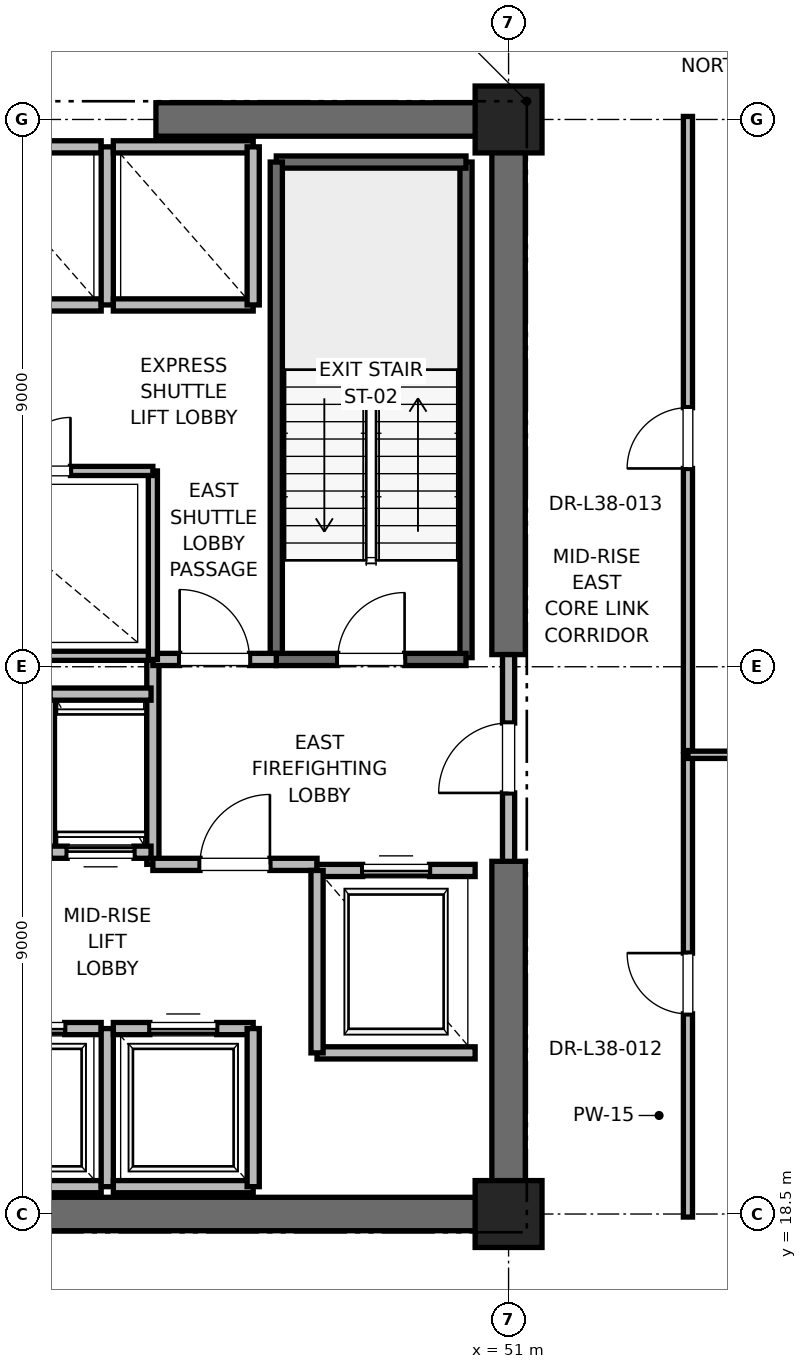
"""IFC4 building model, lengths in metres.
Left out: names, types, materials, properties, quantities, classifications, styles, units other than length and angle.
Written with IfcOpenShell. Run it as: python <this file> out.ifc"""

import sys

from ifc_helpers import new_model, si_unit, direction, frame, frame_2d, origin, origin_2d, place, context, subcontext, project, spatial, rectangle, extrude, element, fill, save


model = new_model("IFC4")
c1 = context("Model", 3, precision=1e-05, world=origin(), true_north=direction((0.0, 1.0)))
c2 = subcontext(c1, "Body", "Model", "MODEL_VIEW")
j1 = project(units=[si_unit("LENGTHUNIT", "METRE"), si_unit("PLANEANGLEUNIT", "RADIAN")], contexts=[c1])
p1 = place(None, origin())
s1 = spatial("IfcSite", under=j1, at=p1, CompositionType="ELEMENT")
p2 = place(p1, origin())
s2 = spatial("IfcBuilding", under=s1, at=p2, CompositionType="ELEMENT")
p3 = place(p2, frame((0.0, 0.0, 164.4)))
s3 = spatial("IfcBuildingStorey", under=s2, at=p3, CompositionType="ELEMENT", Elevation=164.4)
for number, where, z_axis, x_axis in (
    (1, (51.0, 18.5, 0.0), (0.0, 0.0, 1.0), (1.0, 0.0, 0.0)),
    (2, (51.0, 36.5, 0.0), (0.0, 0.0, 1.0), (1.0, 0.0, 0.0)),
):
    element("IfcColumn", number, at=place(p3, frame(where, z_axis=z_axis, x_axis=x_axis)), inside=s3, PredefinedType="PILASTER", context=c2, shape_type="SweptSolid", body=[
        extrude(rectangle(XDim=1.1, YDim=1.1, at=origin_2d()), origin(), (0.0, 0.0, 1.0), 4.0),
    ])
p4 = place(p3, frame((41.8, 18.5, 0.0), z_axis=(0.0, 0.0, 1.0), x_axis=(1.0, 0.0, 0.0)))
e3 = element("IfcWall", 3, at=p4, inside=s3, PredefinedType="SHEAR", context=c2, shape_type="SweptSolid", body=[
    extrude(rectangle(XDim=9.2, YDim=0.55, at=frame_2d((4.6, 0.0))), origin(), (0.0, 0.0, 1.0), 3.775),
])
for number, where, z_axis, x_axis in (
    (4, (45.2, 36.5, 0.0), (0.0, 0.0, 1.0), (1.0, 0.0, 0.0)),
    (5, (51.0, 18.5, 0.0), (0.0, 0.0, 1.0), (0.0, 1.0, 0.0)),
):
    element("IfcWall", number, at=place(p3, frame(where, z_axis=z_axis, x_axis=x_axis)), inside=s3, PredefinedType="SHEAR", context=c2, shape_type="SweptSolid", body=[
        extrude(rectangle(XDim=5.8, YDim=0.55, at=frame_2d((2.9, 0.0))), origin(), (0.0, 0.0, 1.0), 3.775),
    ])
p5 = place(p3, frame((51.0, 27.7, 0.0), z_axis=(0.0, 0.0, 1.0), x_axis=(0.0, 1.0, 0.0)))
e6 = element("IfcWall", 6, at=p5, inside=s3, PredefinedType="SHEAR", context=c2, shape_type="SweptSolid", body=[
    extrude(rectangle(XDim=8.8, YDim=0.55, at=frame_2d((4.4, 0.0))), origin(), (0.0, 0.0, 1.0), 3.775),
])
p6 = place(p3, frame((50.3, 27.65, 0.0), z_axis=(0.0, 0.0, 1.0), x_axis=(0.0, 1.0, 0.0)))
e7 = element("IfcWall", 7, at=p6, inside=s3, PredefinedType="SOLIDWALL", context=c2, shape_type="SweptSolid", body=[
    extrude(rectangle(XDim=8.15, YDim=0.2, at=frame_2d((4.075, 0.0))), origin(), (0.0, 0.0, 1.0), 3.775),
])
p7 = place(p3, frame((47.18, 35.8, 0.0), z_axis=(0.0, 0.0, 1.0), x_axis=(1.0, 0.0, 0.0)))
e8 = element("IfcWall", 8, at=p7, inside=s3, PredefinedType="SOLIDWALL", context=c2, shape_type="SweptSolid", body=[
    extrude(rectangle(XDim=3.12, YDim=0.2, at=frame_2d((1.56, 0.0))), origin(), (0.0, 0.0, 1.0), 3.775),
])
p8 = place(p3, frame((47.18, 27.62, 0.0), z_axis=(0.0, 0.0, 1.0), x_axis=(0.0, 1.0, 0.0)))
e9 = element("IfcWall", 9, at=p8, inside=s3, PredefinedType="SOLIDWALL", context=c2, shape_type="SweptSolid", body=[
    extrude(rectangle(XDim=8.18, YDim=0.2, at=frame_2d((4.09, 0.0))), origin(), (0.0, 0.0, 1.0), 3.775),
])
p9 = place(p3, frame((47.18, 27.62, 0.0), z_axis=(0.0, 0.0, 1.0), x_axis=(1.0, 0.0, 0.0)))
e10 = element("IfcWall", 10, at=p9, inside=s3, PredefinedType="SOLIDWALL", context=c2, shape_type="SweptSolid", body=[
    extrude(rectangle(XDim=3.12, YDim=0.2, at=frame_2d((1.56, 0.0))), origin(), (0.0, 0.0, 1.0), 3.775),
])
p10 = place(p9, frame((1.01, 0.0, 0.0)))
e11 = element("IfcOpeningElement", 11, at=p10, cuts=e10, PredefinedType="OPENING", context=c2, shape_type="SweptSolid", body=[
    extrude(rectangle(XDim=1.1, YDim=2.15, at=frame_2d((0.55, 1.075))), frame((0.0, 0.1, 0.0), z_axis=(0.0, -1.0, 0.0), x_axis=(1.0, 0.0, 0.0)), (0.0, 0.0, 1.0), 0.2),
])
p11 = place(p3, frame((45.15, 24.25, 0.0), z_axis=(0.0, 0.0, 1.0), x_axis=(0.0, 1.0, 0.0)))
e12 = element("IfcWall", 12, at=p11, inside=s3, PredefinedType="PARTITIONING", context=c2, shape_type="SweptSolid", body=[
    extrude(rectangle(XDim=3.37, YDim=0.2, at=frame_2d((1.685, 0.0))), origin(), (0.0, 0.0, 1.0), 3.775),
])
p12 = place(p3, frame((45.15, 24.25, 0.0), z_axis=(0.0, 0.0, 1.0), x_axis=(1.0, 0.0, 0.0)))
e13 = element("IfcWall", 13, at=p12, inside=s3, PredefinedType="PARTITIONING", context=c2, shape_type="SweptSolid", body=[
    extrude(rectangle(XDim=2.7, YDim=0.2, at=frame_2d((1.35, 0.0))), origin(), (0.0, 0.0, 1.0), 3.775),
])
p13 = place(p12, frame((0.775, 0.0, 0.0)))
e14 = element("IfcOpeningElement", 14, at=p13, cuts=e13, PredefinedType="OPENING", context=c2, shape_type="SweptSolid", body=[
    extrude(rectangle(XDim=1.15, YDim=2.2, at=frame_2d((0.575, 1.1))), frame((0.0, 0.1, 0.0), z_axis=(0.0, -1.0, 0.0), x_axis=(1.0, 0.0, 0.0)), (0.0, 0.0, 1.0), 0.2),
])
p14 = place(p3, frame((45.15, 27.62, 0.0), z_axis=(0.0, 0.0, 1.0), x_axis=(1.0, 0.0, 0.0)))
e15 = element("IfcWall", 15, at=p14, inside=s3, PredefinedType="PARTITIONING", context=c2, shape_type="SweptSolid", body=[
    extrude(rectangle(XDim=2.03, YDim=0.2, at=frame_2d((1.015, 0.0))), origin(), (0.0, 0.0, 1.0), 3.775),
])
p15 = place(p14, frame((0.44, 0.0, 0.0)))
e16 = element("IfcOpeningElement", 16, at=p15, cuts=e15, PredefinedType="OPENING", context=c2, shape_type="SweptSolid", body=[
    extrude(rectangle(XDim=1.15, YDim=2.2, at=frame_2d((0.575, 1.1))), frame((0.0, 0.1, 0.0), z_axis=(0.0, -1.0, 0.0), x_axis=(1.0, 0.0, 0.0)), (0.0, 0.0, 1.0), 0.2),
])
p16 = place(p3, frame((51.0, 24.3, 0.0), z_axis=(0.0, 0.0, 1.0), x_axis=(0.0, 1.0, 0.0)))
e17 = element("IfcWall", 17, at=p16, inside=s3, PredefinedType="PARTITIONING", context=c2, shape_type="SweptSolid", body=[
    extrude(rectangle(XDim=3.4, YDim=0.2, at=frame_2d((1.7, 0.0))), origin(), (0.0, 0.0, 1.0), 2.755),
])
p17 = place(p16, frame((1.125, 0.0, 0.0)))
e18 = element("IfcOpeningElement", 18, at=p17, cuts=e17, PredefinedType="OPENING", context=c2, shape_type="SweptSolid", body=[
    extrude(rectangle(XDim=1.15, YDim=2.2, at=frame_2d((0.575, 1.1))), frame((0.0, 0.1, 0.0), z_axis=(0.0, -1.0, 0.0), x_axis=(1.0, 0.0, 0.0)), (0.0, 0.0, 1.0), 0.2),
])
p18 = place(p3, frame((47.85, 21.15, 0.0), z_axis=(0.0, 0.0, 1.0), x_axis=(1.0, 0.0, 0.0)))
e19 = element("IfcWall", 19, at=p18, inside=s3, PredefinedType="SOLIDWALL", context=c2, shape_type="SweptSolid", body=[
    extrude(rectangle(XDim=2.6, YDim=0.2, at=frame_2d((1.3, 0.0))), origin(), (0.0, 0.0, 1.0), 3.775),
])
p19 = place(p3, frame((50.45, 24.15, 0.0), z_axis=(0.0, 0.0, 1.0), x_axis=(-1.0, 0.0, 0.0)))
e20 = element("IfcWall", 20, at=p19, inside=s3, PredefinedType="SOLIDWALL", context=c2, shape_type="SweptSolid", body=[
    extrude(rectangle(XDim=2.6, YDim=0.2, at=frame_2d((1.3, 0.0))), origin(), (0.0, 0.0, 1.0), 2.755),
])
p20 = place(p19, frame((0.75, 0.0, 0.0)))
e21 = element("IfcOpeningElement", 21, at=p20, cuts=e20, PredefinedType="OPENING", context=c2, shape_type="SweptSolid", body=[
    extrude(rectangle(XDim=1.1, YDim=2.2, at=frame_2d((0.55, 1.1))), frame((0.0, 0.1, 0.0), z_axis=(0.0, -1.0, 0.0), x_axis=(1.0, 0.0, 0.0)), (0.0, 0.0, 1.0), 0.2),
])
p21 = place(p3, frame((47.85, 24.15, 0.0), z_axis=(0.0, 0.0, 1.0), x_axis=(0.0, -1.0, 0.0)))
e22 = element("IfcWall", 22, at=p21, inside=s3, PredefinedType="SOLIDWALL", context=c2, shape_type="SweptSolid", body=[
    extrude(rectangle(XDim=3.0, YDim=0.2, at=frame_2d((1.5, 0.0))), origin(), (0.0, 0.0, 1.0), 3.775),
])
p22 = place(p3, frame((42.0, 18.95, 0.0), z_axis=(0.0, 0.0, 1.0), x_axis=(1.0, 0.0, 0.0)))
e23 = element("IfcWall", 23, at=p22, inside=s3, PredefinedType="SOLIDWALL", context=c2, shape_type="SweptSolid", body=[
    extrude(rectangle(XDim=2.3, YDim=0.2, at=frame_2d((1.15, 0.0))), origin(), (0.0, 0.0, 1.0), 2.755),
])
p23 = place(p3, frame((44.3, 21.55, 0.0), z_axis=(0.0, 0.0, 1.0), x_axis=(-1.0, 0.0, 0.0)))
e24 = element("IfcWall", 24, at=p23, inside=s3, PredefinedType="SOLIDWALL", context=c2, shape_type="SweptSolid", body=[
    extrude(rectangle(XDim=2.3, YDim=0.2, at=frame_2d((1.15, 0.0))), origin(), (0.0, 0.0, 1.0), 3.775),
])
p24 = place(p23, frame((0.6, 0.0, 0.0)))
e25 = element("IfcOpeningElement", 25, at=p24, cuts=e24, PredefinedType="OPENING", context=c2, shape_type="SweptSolid", body=[
    extrude(rectangle(XDim=1.1, YDim=2.2, at=frame_2d((0.55, 1.1))), frame((0.0, 0.1, 0.0), z_axis=(0.0, -1.0, 0.0), x_axis=(1.0, 0.0, 0.0)), (0.0, 0.0, 1.0), 0.2),
])
p25 = place(p3, frame((44.4, 18.95, 0.0), z_axis=(0.0, 0.0, 1.0), x_axis=(0.0, 1.0, 0.0)))
e26 = element("IfcWall", 26, at=p25, inside=s3, PredefinedType="SOLIDWALL", context=c2, shape_type="SweptSolid", body=[
    extrude(rectangle(XDim=2.6, YDim=0.2, at=frame_2d((1.3, 0.0))), origin(), (0.0, 0.0, 1.0), 3.775),
])
p26 = place(p3, frame((44.5, 18.95, 0.0), z_axis=(0.0, 0.0, 1.0), x_axis=(1.0, 0.0, 0.0)))
e27 = element("IfcWall", 27, at=p26, inside=s3, PredefinedType="SOLIDWALL", context=c2, shape_type="SweptSolid", body=[
    extrude(rectangle(XDim=2.3, YDim=0.2, at=frame_2d((1.15, 0.0))), origin(), (0.0, 0.0, 1.0), 3.775),
])
p27 = place(p3, frame((46.8, 21.55, 0.0), z_axis=(0.0, 0.0, 1.0), x_axis=(-1.0, 0.0, 0.0)))
e28 = element("IfcWall", 28, at=p27, inside=s3, PredefinedType="SOLIDWALL", context=c2, shape_type="SweptSolid", body=[
    extrude(rectangle(XDim=2.3, YDim=0.2, at=frame_2d((1.15, 0.0))), origin(), (0.0, 0.0, 1.0), 3.775),
])
p28 = place(p27, frame((0.6, 0.0, 0.0)))
e29 = element("IfcOpeningElement", 29, at=p28, cuts=e28, PredefinedType="OPENING", context=c2, shape_type="SweptSolid", body=[
    extrude(rectangle(XDim=1.1, YDim=2.2, at=frame_2d((0.55, 1.1))), frame((0.0, 0.1, 0.0), z_axis=(0.0, -1.0, 0.0), x_axis=(1.0, 0.0, 0.0)), (0.0, 0.0, 1.0), 0.2),
])
for number, where, z_axis, x_axis in (
    (30, (46.8, 18.95, 0.0), (0.0, 0.0, 1.0), (0.0, 1.0, 0.0)),
    (31, (43.45, 24.45, 0.0), (0.0, 0.0, 1.0), (0.0, 1.0, 0.0)),
):
    element("IfcWall", number, at=place(p3, frame(where, z_axis=z_axis, x_axis=x_axis)), inside=s3, PredefinedType="SOLIDWALL", context=c2, shape_type="SweptSolid", body=[
        extrude(rectangle(XDim=2.6, YDim=0.2, at=frame_2d((1.3, 0.0))), origin(), (0.0, 0.0, 1.0), 3.775),
    ])
p29 = place(p3, frame((43.46, 24.45, 0.0), z_axis=(0.0, 0.0, 1.0), x_axis=(1.0, 0.0, 0.0)))
e32 = element("IfcWall", 32, at=p29, inside=s3, PredefinedType="SOLIDWALL", context=c2, shape_type="SweptSolid", body=[
    extrude(rectangle(XDim=1.66, YDim=0.2, at=frame_2d((0.83, 0.0))), origin(), (0.0, 0.0, 1.0), 3.775),
])
p30 = place(p29, frame((0.28, 0.0, 0.0)))
e33 = element("IfcOpeningElement", 33, at=p30, cuts=e32, PredefinedType="OPENING", context=c2, shape_type="SweptSolid", body=[
    extrude(rectangle(XDim=1.1, YDim=2.2, at=frame_2d((0.55, 1.1))), frame((0.0, 0.1, 0.0), z_axis=(0.0, -1.0, 0.0), x_axis=(1.0, 0.0, 0.0)), (0.0, 0.0, 1.0), 0.2),
])
p31 = place(p3, frame((45.12, 27.05, 0.0), z_axis=(0.0, 0.0, 1.0), x_axis=(-1.0, 0.0, 0.0)))
e34 = element("IfcWall", 34, at=p31, inside=s3, PredefinedType="SOLIDWALL", context=c2, shape_type="SweptSolid", body=[
    extrude(rectangle(XDim=1.66, YDim=0.2, at=frame_2d((0.83, 0.0))), origin(), (0.0, 0.0, 1.0), 3.775),
])
p32 = place(p3, frame((42.0, 33.45, 0.0), z_axis=(0.0, 0.0, 1.0), x_axis=(1.0, 0.0, 0.0)))
e35 = element("IfcWall", 35, at=p32, inside=s3, PredefinedType="SOLIDWALL", context=c2, shape_type="SweptSolid", body=[
    extrude(rectangle(XDim=2.3, YDim=0.2, at=frame_2d((1.15, 0.0))), origin(), (0.0, 0.0, 1.0), 3.775),
])
p33 = place(p3, frame((44.3, 36.05, 0.0), z_axis=(0.0, 0.0, 1.0), x_axis=(-1.0, 0.0, 0.0)))
e36 = element("IfcWall", 36, at=p33, inside=s3, PredefinedType="SOLIDWALL", context=c2, shape_type="SweptSolid", body=[
    extrude(rectangle(XDim=2.3, YDim=0.2, at=frame_2d((1.15, 0.0))), origin(), (0.0, 0.0, 1.0), 2.755),
])
p34 = place(p3, frame((44.4, 33.45, 0.0), z_axis=(0.0, 0.0, 1.0), x_axis=(0.0, 1.0, 0.0)))
e37 = element("IfcWall", 37, at=p34, inside=s3, PredefinedType="SOLIDWALL", context=c2, shape_type="SweptSolid", body=[
    extrude(rectangle(XDim=2.6, YDim=0.2, at=frame_2d((1.3, 0.0))), origin(), (0.0, 0.0, 1.0), 2.755),
])
p35 = place(p3, frame((44.5, 33.45, 0.0), z_axis=(0.0, 0.0, 1.0), x_axis=(1.0, 0.0, 0.0)))
e38 = element("IfcWall", 38, at=p35, inside=s3, PredefinedType="SOLIDWALL", context=c2, shape_type="SweptSolid", body=[
    extrude(rectangle(XDim=2.3, YDim=0.2, at=frame_2d((1.15, 0.0))), origin(), (0.0, 0.0, 1.0), 3.775),
])
p36 = place(p3, frame((46.8, 36.05, 0.0), z_axis=(0.0, 0.0, 1.0), x_axis=(-1.0, 0.0, 0.0)))
e39 = element("IfcWall", 39, at=p36, inside=s3, PredefinedType="SOLIDWALL", context=c2, shape_type="SweptSolid", body=[
    extrude(rectangle(XDim=2.3, YDim=0.2, at=frame_2d((1.15, 0.0))), origin(), (0.0, 0.0, 1.0), 2.755),
])
p37 = place(p3, frame((46.8, 33.45, 0.0), z_axis=(0.0, 0.0, 1.0), x_axis=(0.0, 1.0, 0.0)))
e40 = element("IfcWall", 40, at=p37, inside=s3, PredefinedType="SOLIDWALL", context=c2, shape_type="SweptSolid", body=[
    extrude(rectangle(XDim=2.6, YDim=0.2, at=frame_2d((1.3, 0.0))), origin(), (0.0, 0.0, 1.0), 3.775),
])
p38 = place(p3, frame((41.56, 27.68, 0.0), z_axis=(0.0, 0.0, 1.0), x_axis=(1.0, 0.0, 0.0)))
e41 = element("IfcWall", 41, at=p38, inside=s3, PredefinedType="PARTITIONING", context=c2, shape_type="SweptSolid", body=[
    extrude(rectangle(XDim=3.59, YDim=0.15, at=frame_2d((1.795, 0.0))), origin(), (0.0, 0.0, 1.0), 2.85),
])
p39 = place(p3, frame((45.15, 27.62, 0.0), z_axis=(0.0, 0.0, 1.0), x_axis=(0.0, 1.0, 0.0)))
e42 = element("IfcWall", 42, at=p39, inside=s3, PredefinedType="PARTITIONING", context=c2, shape_type="SweptSolid", body=[
    extrude(rectangle(XDim=3.1, YDim=0.15, at=frame_2d((1.55, 0.0))), origin(), (0.0, 0.0, 1.0), 2.85),
])
p40 = place(p3, frame((41.56, 30.72, 0.0), z_axis=(0.0, 0.0, 1.0), x_axis=(1.0, 0.0, 0.0)))
e43 = element("IfcWall", 43, at=p40, inside=s3, PredefinedType="PARTITIONING", context=c2, shape_type="SweptSolid", body=[
    extrude(rectangle(XDim=3.59, YDim=0.15, at=frame_2d((1.795, 0.0))), origin(), (0.0, 0.0, 1.0), 2.85),
])
p41 = place(p40, frame((1.355, 0.0, 0.0)))
e44 = element("IfcOpeningElement", 44, at=p41, cuts=e43, PredefinedType="OPENING", context=c2, shape_type="SweptSolid", body=[
    extrude(rectangle(XDim=0.88, YDim=2.1, at=frame_2d((0.44, 1.05))), frame((0.0, 0.075, 0.0), z_axis=(0.0, -1.0, 0.0), x_axis=(1.0, 0.0, 0.0)), (0.0, 0.0, 1.0), 0.15),
])
p42 = place(p3, frame((53.95, 18.45, 0.0), z_axis=(0.0, 0.0, 1.0), x_axis=(0.0, 1.0, 0.0)))
e45 = element("IfcWall", 45, at=p42, inside=s3, PredefinedType="PARTITIONING", context=c2, shape_type="SweptSolid", body=[
    extrude(rectangle(XDim=7.602, YDim=0.15, at=frame_2d((3.801, 0.0))), origin(), (0.0, 0.0, 1.0), 2.85),
])
p43 = place(p42, frame((3.341, 0.0, 0.0)))
e46 = element("IfcOpeningElement", 46, at=p43, cuts=e45, PredefinedType="OPENING", context=c2, shape_type="SweptSolid", body=[
    extrude(rectangle(XDim=1.0, YDim=2.15, at=frame_2d((0.5, 1.075))), frame((0.0, 0.075, 0.0), z_axis=(0.0, -1.0, 0.0), x_axis=(1.0, 0.0, 0.0)), (0.0, 0.0, 1.0), 0.15),
])
p44 = place(p3, frame((53.95, 26.052, 0.0), z_axis=(0.0, 0.0, 1.0), x_axis=(1.0, 0.0, 0.0)))
e47 = element("IfcWall", 47, at=p44, inside=s3, PredefinedType="PARTITIONING", context=c2, shape_type="SweptSolid", body=[
    extrude(rectangle(XDim=12.648, YDim=0.12, at=frame_2d((6.324, 0.0))), origin(), (0.0, 0.0, 1.0), 2.85),
])
p45 = place(p3, frame((53.95, 26.122, 0.0), z_axis=(0.0, 0.0, 1.0), x_axis=(0.0, 1.0, 0.0)))
e48 = element("IfcWall", 48, at=p45, inside=s3, PredefinedType="PARTITIONING", context=c2, shape_type="SweptSolid", body=[
    extrude(rectangle(XDim=10.428, YDim=0.15, at=frame_2d((5.214, 0.0))), origin(), (0.0, 0.0, 1.0), 2.85),
])
p46 = place(p45, frame((4.639, 0.0, 0.0)))
e49 = element("IfcOpeningElement", 49, at=p46, cuts=e48, PredefinedType="OPENING", context=c2, shape_type="SweptSolid", body=[
    extrude(rectangle(XDim=1.0, YDim=2.15, at=frame_2d((0.5, 1.075))), frame((0.0, 0.075, 0.0), z_axis=(0.0, -1.0, 0.0), x_axis=(1.0, 0.0, 0.0)), (0.0, 0.0, 1.0), 0.15),
])
p47 = place(p10, origin())
e50 = element("IfcDoor", 50, at=p47, inside=s3, OperationType="SINGLE_SWING_RIGHT", PredefinedType="DOOR", context=c2, shape_type="SweptSolid", body=[
    extrude(rectangle(XDim=1.1, YDim=2.15, at=frame_2d((0.55, 1.075))), frame((0.0, 0.025, 0.0), z_axis=(0.0, -1.0, 0.0), x_axis=(1.0, 0.0, 0.0)), (0.0, 0.0, 1.0), 0.05),
])
fill(e11, e50)
p48 = place(p13, origin())
e51 = element("IfcDoor", 51, at=p48, inside=s3, OperationType="SINGLE_SWING_RIGHT", PredefinedType="DOOR", context=c2, shape_type="SweptSolid", body=[
    extrude(rectangle(XDim=1.15, YDim=2.2, at=frame_2d((0.575, 1.1))), frame((0.0, 0.025, 0.0), z_axis=(0.0, -1.0, 0.0), x_axis=(1.0, 0.0, 0.0)), (0.0, 0.0, 1.0), 0.05),
])
fill(e14, e51)
p49 = place(p15, origin())
e52 = element("IfcDoor", 52, at=p49, inside=s3, OperationType="SINGLE_SWING_LEFT", PredefinedType="DOOR", context=c2, shape_type="SweptSolid", body=[
    extrude(rectangle(XDim=1.15, YDim=2.2, at=frame_2d((0.575, 1.1))), frame((0.0, 0.025, 0.0), z_axis=(0.0, -1.0, 0.0), x_axis=(1.0, 0.0, 0.0)), (0.0, 0.0, 1.0), 0.05),
])
fill(e16, e52)
p50 = place(p17, origin())
e53 = element("IfcDoor", 53, at=p50, inside=s3, OperationType="SINGLE_SWING_LEFT", PredefinedType="DOOR", context=c2, shape_type="SweptSolid", body=[
    extrude(rectangle(XDim=1.15, YDim=2.2, at=frame_2d((0.575, 1.1))), frame((0.0, 0.025, 0.0), z_axis=(0.0, -1.0, 0.0), x_axis=(1.0, 0.0, 0.0)), (0.0, 0.0, 1.0), 0.05),
])
fill(e18, e53)
p51 = place(p20, origin())
e54 = element("IfcDoor", 54, at=p51, inside=s3, OperationType="SLIDING_TO_RIGHT", PredefinedType="DOOR", context=c2, shape_type="SweptSolid", body=[
    extrude(rectangle(XDim=1.1, YDim=2.2, at=frame_2d((0.55, 1.1))), frame((0.0, 0.025, 0.0), z_axis=(0.0, -1.0, 0.0), x_axis=(1.0, 0.0, 0.0)), (0.0, 0.0, 1.0), 0.05),
])
fill(e21, e54)
p52 = place(p24, origin())
e55 = element("IfcDoor", 55, at=p52, inside=s3, OperationType="SLIDING_TO_RIGHT", PredefinedType="DOOR", context=c2, shape_type="SweptSolid", body=[
    extrude(rectangle(XDim=1.1, YDim=2.2, at=frame_2d((0.55, 1.1))), frame((0.0, 0.025, 0.0), z_axis=(0.0, -1.0, 0.0), x_axis=(1.0, 0.0, 0.0)), (0.0, 0.0, 1.0), 0.05),
])
fill(e25, e55)
p53 = place(p28, origin())
e56 = element("IfcDoor", 56, at=p53, inside=s3, OperationType="SLIDING_TO_RIGHT", PredefinedType="DOOR", context=c2, shape_type="SweptSolid", body=[
    extrude(rectangle(XDim=1.1, YDim=2.2, at=frame_2d((0.55, 1.1))), frame((0.0, 0.025, 0.0), z_axis=(0.0, -1.0, 0.0), x_axis=(1.0, 0.0, 0.0)), (0.0, 0.0, 1.0), 0.05),
])
fill(e29, e56)
p54 = place(p30, origin())
e57 = element("IfcDoor", 57, at=p54, inside=s3, OperationType="SLIDING_TO_RIGHT", PredefinedType="DOOR", context=c2, shape_type="SweptSolid", body=[
    extrude(rectangle(XDim=1.1, YDim=2.2, at=frame_2d((0.55, 1.1))), frame((0.0, 0.025, 0.0), z_axis=(0.0, -1.0, 0.0), x_axis=(1.0, 0.0, 0.0)), (0.0, 0.0, 1.0), 0.05),
])
fill(e33, e57)
p55 = place(p41, origin())
e58 = element("IfcDoor", 58, at=p55, inside=s3, OperationType="SINGLE_SWING_RIGHT", PredefinedType="DOOR", context=c2, shape_type="SweptSolid", body=[
    extrude(rectangle(XDim=0.88, YDim=2.1, at=frame_2d((0.44, 1.05))), frame((0.0, 0.025, 0.0), z_axis=(0.0, -1.0, 0.0), x_axis=(1.0, 0.0, 0.0)), (0.0, 0.0, 1.0), 0.05),
])
fill(e44, e58)
p56 = place(p43, origin())
e59 = element("IfcDoor", 59, at=p56, inside=s3, OperationType="SINGLE_SWING_RIGHT", PredefinedType="DOOR", context=c2, shape_type="SweptSolid", body=[
    extrude(rectangle(XDim=1.0, YDim=2.15, at=frame_2d((0.5, 1.075))), frame((0.0, 0.025, 0.0), z_axis=(0.0, -1.0, 0.0), x_axis=(1.0, 0.0, 0.0)), (0.0, 0.0, 1.0), 0.05),
])
fill(e46, e59)
p57 = place(p46, origin())
e60 = element("IfcDoor", 60, at=p57, inside=s3, OperationType="SINGLE_SWING_LEFT", PredefinedType="DOOR", context=c2, shape_type="SweptSolid", body=[
    extrude(rectangle(XDim=1.0, YDim=2.15, at=frame_2d((0.5, 1.075))), frame((0.0, 0.025, 0.0), z_axis=(0.0, -1.0, 0.0), x_axis=(1.0, 0.0, 0.0)), (0.0, 0.0, 1.0), 0.05),
])
fill(e49, e60)
save(model, sys.argv[1])
